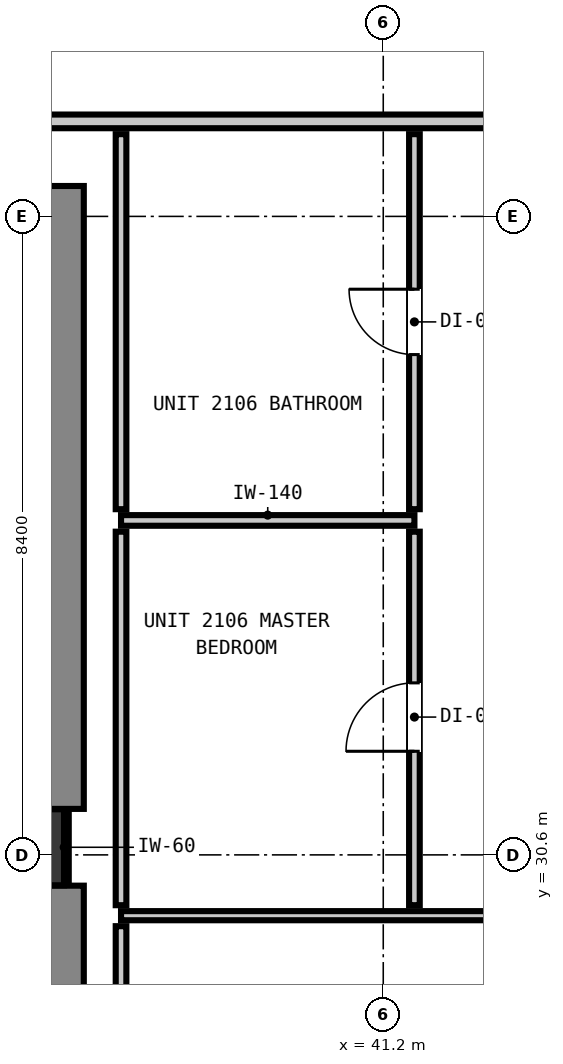
"""IFC4 building model, lengths in metres.
Left out: names, types, materials, properties, quantities, classifications, styles, units other than length and angle.
Written with IfcOpenShell. Run it as: python <this file> out.ifc"""

import sys

from ifc_helpers import new_model, si_unit, direction, frame, frame_2d, origin, origin_2d, place, context, subcontext, project, spatial, rectangle, extrude, element, fill, save


model = new_model("IFC4")
c1 = context("Model", 3, precision=1e-05, world=origin(), true_north=direction((0.0, 1.0)))
c2 = subcontext(c1, "Body", "Model", "MODEL_VIEW")
j1 = project(units=[si_unit("LENGTHUNIT", "METRE"), si_unit("PLANEANGLEUNIT", "RADIAN")], contexts=[c1])
p1 = place(None, origin())
s1 = spatial("IfcSite", under=j1, at=p1, CompositionType="ELEMENT")
p2 = place(p1, origin())
s2 = spatial("IfcBuilding", under=s1, at=p2, CompositionType="ELEMENT")
p3 = place(p2, frame((0.0, 0.0, 75.12)))
s3 = spatial("IfcBuildingStorey", under=s2, at=p3, CompositionType="ELEMENT", Elevation=75.12)
p4 = place(p3, frame((36.5, 30.7, 0.0), z_axis=(0.0, 0.0, 1.0), x_axis=(1.0, 0.0, 0.0)))
e1 = element("IfcColumn", 1, at=p4, inside=s3, PredefinedType="COLUMN", context=c2, shape_type="SweptSolid", body=[
    extrude(rectangle(XDim=1.0, YDim=1.0, at=origin_2d()), origin(), (0.0, 0.0, 1.0), 3.32),
])
p5 = place(p3, frame((36.66, 22.0, 0.0), z_axis=(0.0, 0.0, 1.0), x_axis=(0.0, 1.0, 0.0)))
e2 = element("IfcWall", 2, at=p5, inside=s3, PredefinedType="SHEAR", context=c2, shape_type="SweptSolid", body=[
    extrude(rectangle(XDim=8.195, YDim=1.2, at=frame_2d((4.098, 0.0))), origin(), (0.0, 0.0, 1.0), 3.32),
])
p6 = place(p3, frame((36.66, 31.205, 0.0), z_axis=(0.0, 0.0, 1.0), x_axis=(0.0, 1.0, 0.0)))
e3 = element("IfcWall", 3, at=p6, inside=s3, PredefinedType="SHEAR", context=c2, shape_type="SweptSolid", body=[
    extrude(rectangle(XDim=8.195, YDim=1.2, at=frame_2d((4.097, 0.0))), origin(), (0.0, 0.0, 1.0), 3.32),
])
p7 = place(p3, frame((10.15, 40.25, 0.0), z_axis=(0.0, 0.0, 1.0), x_axis=(1.0, 0.0, 0.0)))
e4 = element("IfcWall", 4, at=p7, inside=s3, PredefinedType="PARTITIONING", context=c2, shape_type="SweptSolid", body=[
    extrude(rectangle(XDim=40.023, YDim=0.18, at=frame_2d((20.012, 0.0))), origin(), (0.0, 0.0, 1.0), 3.06),
])
p8 = place(p7, frame((7.285, 0.0, 0.0)))
e5 = element("IfcOpeningElement", 5, at=p8, cuts=e4, PredefinedType="OPENING", context=c2, shape_type="SweptSolid", body=[
    extrude(rectangle(XDim=1.4, YDim=2.15, at=frame_2d((0.7, 1.075))), frame((0.0, 0.1, 0.0), z_axis=(0.0, -1.0, 0.0), x_axis=(1.0, 0.0, 0.0)), (0.0, 0.0, 1.0), 0.2),
])
p9 = place(p7, frame((0.324, 0.0, 0.0)))
e6 = element("IfcOpeningElement", 6, at=p9, cuts=e4, PredefinedType="OPENING", context=c2, shape_type="SweptSolid", body=[
    extrude(rectangle(XDim=1.4, YDim=2.15, at=frame_2d((0.7, 1.075))), frame((0.0, 0.1, 0.0), z_axis=(0.0, -1.0, 0.0), x_axis=(1.0, 0.0, 0.0)), (0.0, 0.0, 1.0), 0.2),
])
p10 = place(p7, frame((33.574, 0.0, 0.0)))
e7 = element("IfcOpeningElement", 7, at=p10, cuts=e4, PredefinedType="OPENING", context=c2, shape_type="SweptSolid", body=[
    extrude(rectangle(XDim=1.0, YDim=2.15, at=frame_2d((0.5, 1.075))), frame((0.0, 0.1, 0.0), z_axis=(0.0, -1.0, 0.0), x_axis=(1.0, 0.0, 0.0)), (0.0, 0.0, 1.0), 0.2),
])
p11 = place(p3, frame((37.75, 35.0, 0.0), z_axis=(0.0, 0.0, 1.0), x_axis=(1.0, 0.0, 0.0)))
e8 = element("IfcWall", 8, at=p11, inside=s3, PredefinedType="PARTITIONING", context=c2, shape_type="SweptSolid", body=[
    extrude(rectangle(XDim=3.86, YDim=0.14, at=frame_2d((1.93, 0.0))), origin(), (0.0, 0.0, 1.0), 3.06),
])
p12 = place(p3, frame((37.75, 29.8, 0.0), z_axis=(0.0, 0.0, 1.0), x_axis=(1.0, 0.0, 0.0)))
e9 = element("IfcWall", 9, at=p12, inside=s3, PredefinedType="PARTITIONING", context=c2, shape_type="SweptSolid", body=[
    extrude(rectangle(XDim=12.423, YDim=0.12, at=frame_2d((6.211, 0.0))), origin(), (0.0, 0.0, 1.0), 3.06),
])
p13 = place(p3, frame((37.75, 21.348, 0.0), z_axis=(0.0, 0.0, 1.0), x_axis=(0.0, 1.0, 0.0)))
e10 = element("IfcWall", 10, at=p13, inside=s3, PredefinedType="PARTITIONING", context=c2, shape_type="SweptSolid", body=[
    extrude(rectangle(XDim=8.314, YDim=0.14, at=frame_2d((4.157, 0.0))), origin(), (0.0, 0.0, 1.0), 3.06),
])
p14 = place(p3, frame((37.75, 29.938, 0.0), z_axis=(0.0, 0.0, 1.0), x_axis=(0.0, 1.0, 0.0)))
e11 = element("IfcWall", 11, at=p14, inside=s3, PredefinedType="PARTITIONING", context=c2, shape_type="SweptSolid", body=[
    extrude(rectangle(XDim=4.914, YDim=0.14, at=frame_2d((2.457, 0.0))), origin(), (0.0, 0.0, 1.0), 3.06),
])
p15 = place(p3, frame((37.75, 35.148, 0.0), z_axis=(0.0, 0.0, 1.0), x_axis=(0.0, 1.0, 0.0)))
e12 = element("IfcWall", 12, at=p15, inside=s3, PredefinedType="PARTITIONING", context=c2, shape_type="SweptSolid", body=[
    extrude(rectangle(XDim=4.934, YDim=0.14, at=frame_2d((2.467, 0.0))), origin(), (0.0, 0.0, 1.0), 3.06),
])
p16 = place(p3, frame((41.61, 29.938, 0.0), z_axis=(0.0, 0.0, 1.0), x_axis=(0.0, 1.0, 0.0)))
e13 = element("IfcWall", 13, at=p16, inside=s3, PredefinedType="PARTITIONING", context=c2, shape_type="SweptSolid", body=[
    extrude(rectangle(XDim=4.914, YDim=0.14, at=frame_2d((2.457, 0.0))), origin(), (0.0, 0.0, 1.0), 3.06),
])
p17 = place(p16, frame((2.025, 0.0, 0.0)))
e14 = element("IfcOpeningElement", 14, at=p17, cuts=e13, PredefinedType="OPENING", context=c2, shape_type="SweptSolid", body=[
    extrude(rectangle(XDim=0.9, YDim=2.1, at=frame_2d((0.45, 1.05))), frame((0.0, 0.08, 0.0), z_axis=(0.0, -1.0, 0.0), x_axis=(1.0, 0.0, 0.0)), (0.0, 0.0, 1.0), 0.16),
])
p18 = place(p3, frame((41.61, 35.148, 0.0), z_axis=(0.0, 0.0, 1.0), x_axis=(0.0, 1.0, 0.0)))
e15 = element("IfcWall", 15, at=p18, inside=s3, PredefinedType="PARTITIONING", context=c2, shape_type="SweptSolid", body=[
    extrude(rectangle(XDim=4.934, YDim=0.14, at=frame_2d((2.467, 0.0))), origin(), (0.0, 0.0, 1.0), 3.06),
])
p19 = place(p18, frame((2.034, 0.0, 0.0)))
e16 = element("IfcOpeningElement", 16, at=p19, cuts=e15, PredefinedType="OPENING", context=c2, shape_type="SweptSolid", body=[
    extrude(rectangle(XDim=0.86, YDim=2.02, at=frame_2d((0.43, 1.01))), frame((0.0, 0.08, 0.0), z_axis=(0.0, -1.0, 0.0), x_axis=(1.0, 0.0, 0.0)), (0.0, 0.0, 1.0), 0.16),
])
p20 = place(p3, frame((37.032, 30.21, 0.0), z_axis=(0.0, 0.0, 1.0), x_axis=(0.0, 1.0, 0.0)))
e17 = element("IfcWall", 17, at=p20, inside=s3, PredefinedType="PARTITIONING", context=c2, shape_type="SweptSolid", body=[
    extrude(rectangle(XDim=0.98, YDim=0.06, at=frame_2d((0.49, 0.0))), origin(), (0.0, 0.0, 1.0), 1.45),
])
p21 = place(p19, origin())
e18 = element("IfcDoor", 18, at=p21, inside=s3, OperationType="SINGLE_SWING_RIGHT", PredefinedType="DOOR", context=c2, shape_type="SweptSolid", body=[
    extrude(rectangle(XDim=0.86, YDim=2.02, at=frame_2d((0.43, 1.01))), frame((0.0, 0.025, 0.0), z_axis=(0.0, -1.0, 0.0), x_axis=(1.0, 0.0, 0.0)), (0.0, 0.0, 1.0), 0.05),
])
fill(e16, e18)
p22 = place(p17, origin())
e19 = element("IfcDoor", 19, at=p22, inside=s3, OperationType="SINGLE_SWING_LEFT", PredefinedType="DOOR", context=c2, shape_type="SweptSolid", body=[
    extrude(rectangle(XDim=0.9, YDim=2.1, at=frame_2d((0.45, 1.05))), frame((0.0, 0.025, 0.0), z_axis=(0.0, -1.0, 0.0), x_axis=(1.0, 0.0, 0.0)), (0.0, 0.0, 1.0), 0.05),
])
fill(e14, e19)
save(model, sys.argv[1])
